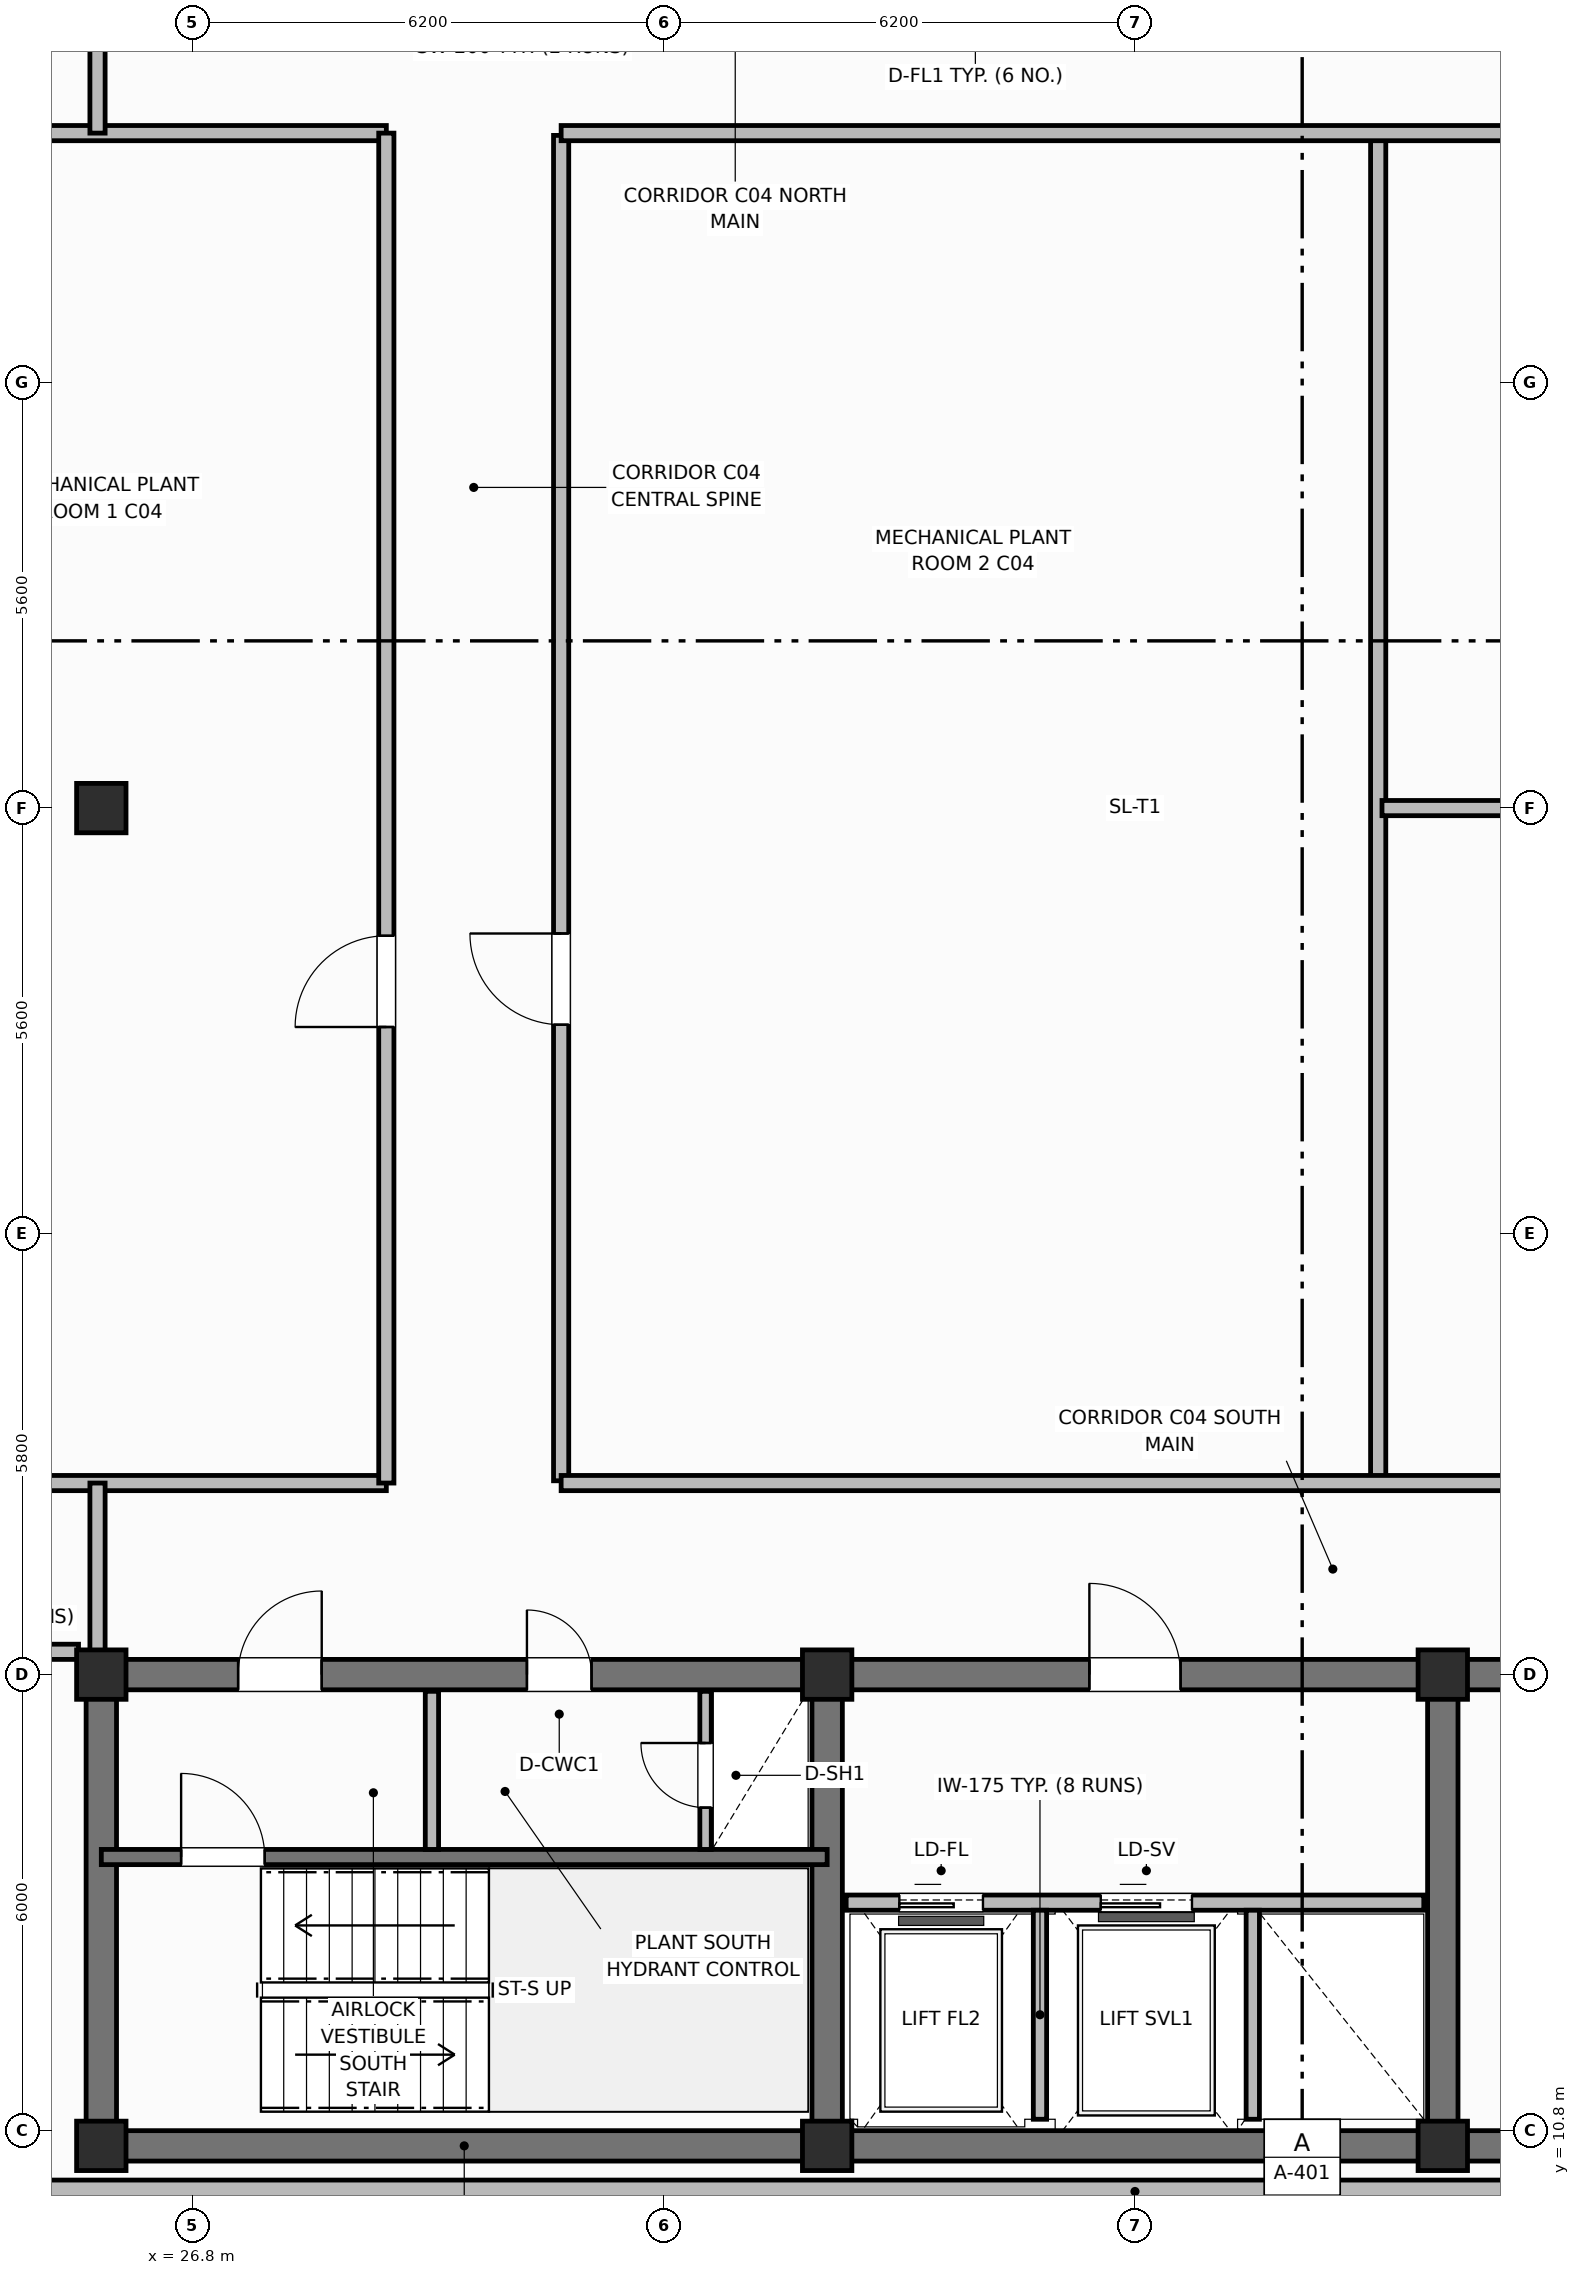
"""IFC4 building model, lengths in metres.
Left out: names, types, materials, properties, quantities, classifications, styles, units other than length and angle.
Written with IfcOpenShell. Run it as: python <this file> out.ifc"""

import sys

from ifc_helpers import new_model, si_unit, direction, frame, frame_2d, origin, origin_2d, place, context, subcontext, project, spatial, rectangle, extrude, element, fill, save


model = new_model("IFC4")
c1 = context("Model", 3, precision=1e-05, world=origin(), true_north=direction((0.0, 1.0)))
c2 = subcontext(c1, "Body", "Model", "MODEL_VIEW")
j1 = project(units=[si_unit("LENGTHUNIT", "METRE"), si_unit("PLANEANGLEUNIT", "RADIAN")], contexts=[c1])
p1 = place(None, origin())
s1 = spatial("IfcSite", under=j1, at=p1, CompositionType="ELEMENT")
p2 = place(p1, origin())
s2 = spatial("IfcBuilding", under=s1, at=p2, CompositionType="ELEMENT")
p3 = place(p2, frame((0.0, 0.0, 312.8)))
s3 = spatial("IfcBuildingStorey", under=s2, at=p3, CompositionType="ELEMENT", Elevation=312.8)
p4 = place(p3, frame((52.8, 10.6, 0.0), z_axis=(0.0, 0.0, 1.0), x_axis=(-1.0, 0.0, 0.0)))
e1 = element("IfcWall", 1, at=p4, inside=s3, PredefinedType="SHEAR", context=c2, shape_type="SweptSolid", body=[
    extrude(rectangle(XDim=27.2, YDim=0.4, at=frame_2d((13.6, 0.0))), origin(), (0.0, 0.0, 1.0), 3.6),
])
p5 = place(p3, frame((25.6, 10.8, 0.0), z_axis=(0.0, 0.0, 1.0), x_axis=(0.0, 1.0, 0.0)))
e2 = element("IfcWall", 2, at=p5, inside=s3, PredefinedType="SHEAR", context=c2, shape_type="SweptSolid", body=[
    extrude(rectangle(XDim=5.8, YDim=0.4, at=frame_2d((2.9, 0.0))), origin(), (0.0, 0.0, 1.0), 3.6),
])
p6 = place(p3, frame((25.6, 16.8, 0.0), z_axis=(0.0, 0.0, 1.0), x_axis=(1.0, 0.0, 0.0)))
e3 = element("IfcWall", 3, at=p6, inside=s3, PredefinedType="SHEAR", context=c2, shape_type="SweptSolid", body=[
    extrude(rectangle(XDim=27.2, YDim=0.4, at=frame_2d((13.6, 0.0))), origin(), (0.0, 0.0, 1.0), 3.6),
])
p7 = place(p6, frame((1.8, 0.0, 0.0)))
e4 = element("IfcOpeningElement", 4, at=p7, cuts=e3, PredefinedType="OPENING", context=c2, shape_type="SweptSolid", body=[
    extrude(rectangle(XDim=1.1, YDim=2.15, at=frame_2d((0.55, 1.075))), frame((0.0, 0.21, 0.0), z_axis=(0.0, -1.0, 0.0), x_axis=(1.0, 0.0, 0.0)), (0.0, 0.0, 1.0), 0.42),
])
p8 = place(p6, frame((5.6, 0.0, 0.0)))
e5 = element("IfcOpeningElement", 5, at=p8, cuts=e3, PredefinedType="OPENING", context=c2, shape_type="SweptSolid", body=[
    extrude(rectangle(XDim=0.85, YDim=2.1, at=frame_2d((0.425, 1.05))), frame((0.0, 0.21, 0.0), z_axis=(0.0, -1.0, 0.0), x_axis=(1.0, 0.0, 0.0)), (0.0, 0.0, 1.0), 0.42),
])
p9 = place(p6, frame((13.0, 0.0, 0.0)))
e6 = element("IfcOpeningElement", 6, at=p9, cuts=e3, PredefinedType="OPENING", context=c2, shape_type="SweptSolid", body=[
    extrude(rectangle(XDim=1.2, YDim=2.15, at=frame_2d((0.6, 1.075))), frame((0.0, 0.21, 0.0), z_axis=(0.0, -1.0, 0.0), x_axis=(1.0, 0.0, 0.0)), (0.0, 0.0, 1.0), 0.42),
])
p10 = place(p6, frame((19.2, 0.0, 0.0)))
e7 = element("IfcOpeningElement", 7, at=p10, cuts=e3, PredefinedType="OPENING", context=c2, shape_type="SweptSolid", body=[
    extrude(rectangle(XDim=0.85, YDim=2.1, at=frame_2d((0.425, 1.05))), frame((0.0, 0.21, 0.0), z_axis=(0.0, -1.0, 0.0), x_axis=(1.0, 0.0, 0.0)), (0.0, 0.0, 1.0), 0.42),
])
p11 = place(p6, frame((23.8, 0.0, 0.0)))
e8 = element("IfcOpeningElement", 8, at=p11, cuts=e3, PredefinedType="OPENING", context=c2, shape_type="SweptSolid", body=[
    extrude(rectangle(XDim=0.9, YDim=2.1, at=frame_2d((0.45, 1.05))), frame((0.0, 0.21, 0.0), z_axis=(0.0, -1.0, 0.0), x_axis=(1.0, 0.0, 0.0)), (0.0, 0.0, 1.0), 0.42),
])
for number, where, z_axis, x_axis in (
    (9, (35.15, 10.8, 0.0), (0.0, 0.0, 1.0), (0.0, 1.0, 0.0)),
    (10, (43.25, 10.8, 0.0), (0.0, 0.0, 1.0), (0.0, 1.0, 0.0)),
):
    element("IfcWall", number, at=place(p3, frame(where, z_axis=z_axis, x_axis=x_axis)), inside=s3, PredefinedType="SHEAR", context=c2, shape_type="SweptSolid", body=[
        extrude(rectangle(XDim=5.8, YDim=0.4, at=frame_2d((2.9, 0.0))), origin(), (0.0, 0.0, 1.0), 3.6),
    ])
for number, where, z_axis, x_axis in (
    (11, (25.6, 10.6, 0.0), (0.0, 0.0, 1.0), (1.0, 0.0, 0.0)),
    (12, (25.6, 16.8, 0.0), (0.0, 0.0, 1.0), (1.0, 0.0, 0.0)),
    (13, (35.15, 10.6, 0.0), (0.0, 0.0, 1.0), (1.0, 0.0, 0.0)),
    (14, (35.15, 16.8, 0.0), (0.0, 0.0, 1.0), (1.0, 0.0, 0.0)),
    (15, (43.25, 10.6, 0.0), (0.0, 0.0, 1.0), (1.0, 0.0, 0.0)),
    (16, (43.25, 16.8, 0.0), (0.0, 0.0, 1.0), (1.0, 0.0, 0.0)),
    (17, (25.6, 28.2, 0.0), (0.0, 0.0, 1.0), (1.0, 0.0, 0.0)),
):
    element("IfcColumn", number, at=place(p3, frame(where, z_axis=z_axis, x_axis=x_axis)), inside=s3, PredefinedType="COLUMN", context=c2, shape_type="SweptSolid", body=[
        extrude(rectangle(XDim=0.65, YDim=0.65, at=origin_2d()), origin(), (0.0, 0.0, 1.0), 3.6),
    ])
p12 = place(p3, frame((23.76, 10.0, 0.0), z_axis=(0.0, 0.0, 1.0), x_axis=(1.0, 0.0, 0.0)))
e18 = element("IfcWall", 18, at=p12, inside=s3, PredefinedType="SOLIDWALL", context=c2, shape_type="SweptSolid", body=[
    extrude(rectangle(XDim=30.88, YDim=0.3, at=frame_2d((15.44, 0.0))), origin(), (0.0, 0.0, 1.0), 2.84),
])
p13 = place(p3, frame((25.6, 14.4, 0.0), z_axis=(0.0, 0.0, 1.0), x_axis=(1.0, 0.0, 0.0)))
e19 = element("IfcWall", 19, at=p13, inside=s3, PredefinedType="SHEAR", context=c2, shape_type="SweptSolid", body=[
    extrude(rectangle(XDim=9.55, YDim=0.2, at=frame_2d((4.775, 0.0))), origin(), (0.0, 0.0, 1.0), 3.6),
])
p14 = place(p13, frame((1.05, 0.0, 0.0)))
e20 = element("IfcOpeningElement", 20, at=p14, cuts=e19, PredefinedType="OPENING", context=c2, shape_type="SweptSolid", body=[
    extrude(rectangle(XDim=1.1, YDim=2.15, at=frame_2d((0.55, 1.075))), frame((0.0, 0.11, 0.0), z_axis=(0.0, -1.0, 0.0), x_axis=(1.0, 0.0, 0.0)), (0.0, 0.0, 1.0), 0.22),
])
p15 = place(p3, frame((29.95, 14.5, 0.0), z_axis=(0.0, 0.0, 1.0), x_axis=(0.0, 1.0, 0.0)))
e21 = element("IfcWall", 21, at=p15, inside=s3, PredefinedType="PARTITIONING", context=c2, shape_type="SweptSolid", body=[
    extrude(rectangle(XDim=2.08, YDim=0.175, at=frame_2d((1.04, 0.0))), origin(), (0.0, 0.0, 1.0), 2.54),
])
p16 = place(p3, frame((33.55, 14.5, 0.0), z_axis=(0.0, 0.0, 1.0), x_axis=(0.0, 1.0, 0.0)))
e22 = element("IfcWall", 22, at=p16, inside=s3, PredefinedType="PARTITIONING", context=c2, shape_type="SweptSolid", body=[
    extrude(rectangle(XDim=2.08, YDim=0.15, at=frame_2d((1.04, 0.0))), origin(), (0.0, 0.0, 1.0), 2.54),
])
p17 = place(p16, frame((0.55, 0.0, 0.0)))
e23 = element("IfcOpeningElement", 23, at=p17, cuts=e22, PredefinedType="OPENING", context=c2, shape_type="SweptSolid", body=[
    extrude(rectangle(XDim=0.85, YDim=2.05, at=frame_2d((0.425, 1.025))), frame((0.0, 0.085, 0.0), z_axis=(0.0, -1.0, 0.0), x_axis=(1.0, 0.0, 0.0)), (0.0, 0.0, 1.0), 0.17),
])
p18 = place(p3, frame((35.4, 13.8, 0.0), z_axis=(0.0, 0.0, 1.0), x_axis=(1.0, 0.0, 0.0)))
e24 = element("IfcWall", 24, at=p18, inside=s3, PredefinedType="PARTITIONING", context=c2, shape_type="SweptSolid", body=[
    extrude(rectangle(XDim=7.6, YDim=0.2, at=frame_2d((3.8, 0.0))), origin(), (0.0, 0.0, 1.0), 2.2),
])
p19 = place(p18, frame((0.7, 0.0, 0.0)))
e25 = element("IfcOpeningElement", 25, at=p19, cuts=e24, PredefinedType="OPENING", context=c2, shape_type="SweptSolid", body=[
    extrude(rectangle(XDim=1.1, YDim=2.15, at=frame_2d((0.55, 1.075))), frame((0.0, 0.11, 0.0), z_axis=(0.0, -1.0, 0.0), x_axis=(1.0, 0.0, 0.0)), (0.0, 0.0, 1.0), 0.22),
])
p20 = place(p18, frame((3.35, 0.0, 0.0)))
e26 = element("IfcOpeningElement", 26, at=p20, cuts=e24, PredefinedType="OPENING", context=c2, shape_type="SweptSolid", body=[
    extrude(rectangle(XDim=1.2, YDim=2.15, at=frame_2d((0.6, 1.075))), frame((0.0, 0.11, 0.0), z_axis=(0.0, -1.0, 0.0), x_axis=(1.0, 0.0, 0.0)), (0.0, 0.0, 1.0), 0.22),
])
for number, where, z_axis, x_axis in (
    (27, (37.95, 10.95, 0.0), (0.0, 0.0, 1.0), (0.0, 1.0, 0.0)),
    (28, (40.75, 10.95, 0.0), (0.0, 0.0, 1.0), (0.0, 1.0, 0.0)),
):
    element("IfcWall", number, at=place(p3, frame(where, z_axis=z_axis, x_axis=x_axis)), inside=s3, PredefinedType="PARTITIONING", context=c2, shape_type="SweptSolid", body=[
        extrude(rectangle(XDim=2.75, YDim=0.175, at=frame_2d((1.375, 0.0))), origin(), (0.0, 0.0, 1.0), 2.54),
    ])
for number, where, z_axis, x_axis in (
    (29, (21.53, 19.32, 0.0), (0.0, 0.0, 1.0), (1.0, 0.0, 0.0)),
    (30, (21.53, 37.08, 0.0), (0.0, 0.0, 1.0), (1.0, 0.0, 0.0)),
):
    element("IfcWall", number, at=place(p3, frame(where, z_axis=z_axis, x_axis=x_axis)), inside=s3, PredefinedType="PARTITIONING", context=c2, shape_type="SweptSolid", body=[
        extrude(rectangle(XDim=7.82, YDim=0.2, at=frame_2d((3.91, 0.0))), origin(), (0.0, 0.0, 1.0), 2.54),
    ])
p21 = place(p3, frame((29.35, 19.32, 0.0), z_axis=(0.0, 0.0, 1.0), x_axis=(0.0, 1.0, 0.0)))
e31 = element("IfcWall", 31, at=p21, inside=s3, PredefinedType="PARTITIONING", context=c2, shape_type="SweptSolid", body=[
    extrude(rectangle(XDim=17.76, YDim=0.2, at=frame_2d((8.88, 0.0))), origin(), (0.0, 0.0, 1.0), 2.54),
])
p22 = place(p21, frame((6.0, 0.0, 0.0)))
e32 = element("IfcOpeningElement", 32, at=p22, cuts=e31, PredefinedType="OPENING", context=c2, shape_type="SweptSolid", body=[
    extrude(rectangle(XDim=1.2, YDim=2.15, at=frame_2d((0.6, 1.075))), frame((0.0, 0.11, 0.0), z_axis=(0.0, -1.0, 0.0), x_axis=(1.0, 0.0, 0.0)), (0.0, 0.0, 1.0), 0.22),
])
p23 = place(p3, frame((31.65, 19.35, 0.0), z_axis=(0.0, 0.0, 1.0), x_axis=(0.0, 1.0, 0.0)))
e33 = element("IfcWall", 33, at=p23, inside=s3, PredefinedType="PARTITIONING", context=c2, shape_type="SweptSolid", body=[
    extrude(rectangle(XDim=17.7, YDim=0.2, at=frame_2d((8.85, 0.0))), origin(), (0.0, 0.0, 1.0), 2.54),
])
p24 = place(p23, frame((6.0, 0.0, 0.0)))
e34 = element("IfcOpeningElement", 34, at=p24, cuts=e33, PredefinedType="OPENING", context=c2, shape_type="SweptSolid", body=[
    extrude(rectangle(XDim=1.2, YDim=2.15, at=frame_2d((0.6, 1.075))), frame((0.0, 0.11, 0.0), z_axis=(0.0, -1.0, 0.0), x_axis=(1.0, 0.0, 0.0)), (0.0, 0.0, 1.0), 0.22),
])
p25 = place(p3, frame((42.4, 19.35, 0.0), z_axis=(0.0, 0.0, 1.0), x_axis=(0.0, 1.0, 0.0)))
e35 = element("IfcWall", 35, at=p25, inside=s3, PredefinedType="PARTITIONING", context=c2, shape_type="SweptSolid", body=[
    extrude(rectangle(XDim=17.7, YDim=0.2, at=frame_2d((8.85, 0.0))), origin(), (0.0, 0.0, 1.0), 2.54),
])
p26 = place(p3, frame((42.45, 28.2, 0.0), z_axis=(0.0, 0.0, 1.0), x_axis=(1.0, 0.0, 0.0)))
e36 = element("IfcWall", 36, at=p26, inside=s3, PredefinedType="PARTITIONING", context=c2, shape_type="SweptSolid", body=[
    extrude(rectangle(XDim=14.42, YDim=0.2, at=frame_2d((7.21, 0.0))), origin(), (0.0, 0.0, 1.0), 2.54),
])
p27 = place(p3, frame((31.65, 19.32, 0.0), z_axis=(0.0, 0.0, 1.0), x_axis=(1.0, 0.0, 0.0)))
e37 = element("IfcWall", 37, at=p27, inside=s3, PredefinedType="PARTITIONING", context=c2, shape_type="SweptSolid", body=[
    extrude(rectangle(XDim=25.22, YDim=0.2, at=frame_2d((12.61, 0.0))), origin(), (0.0, 0.0, 1.0), 2.54),
])
p28 = place(p27, frame((17.15, 0.0, 0.0)))
e38 = element("IfcOpeningElement", 38, at=p28, cuts=e37, PredefinedType="OPENING", context=c2, shape_type="SweptSolid", body=[
    extrude(rectangle(XDim=1.2, YDim=2.15, at=frame_2d((0.6, 1.075))), frame((0.0, 0.11, 0.0), z_axis=(0.0, -1.0, 0.0), x_axis=(1.0, 0.0, 0.0)), (0.0, 0.0, 1.0), 0.22),
])
p29 = place(p3, frame((56.87, 37.08, 0.0), z_axis=(0.0, 0.0, 1.0), x_axis=(-1.0, 0.0, 0.0)))
e39 = element("IfcWall", 39, at=p29, inside=s3, PredefinedType="PARTITIONING", context=c2, shape_type="SweptSolid", body=[
    extrude(rectangle(XDim=25.22, YDim=0.2, at=frame_2d((12.61, 0.0))), origin(), (0.0, 0.0, 1.0), 2.54),
])
p30 = place(p29, frame((6.87, 0.0, 0.0)))
e40 = element("IfcOpeningElement", 40, at=p30, cuts=e39, PredefinedType="OPENING", context=c2, shape_type="SweptSolid", body=[
    extrude(rectangle(XDim=1.2, YDim=2.15, at=frame_2d((0.6, 1.075))), frame((0.0, 0.11, 0.0), z_axis=(0.0, -1.0, 0.0), x_axis=(1.0, 0.0, 0.0)), (0.0, 0.0, 1.0), 0.22),
])
p31 = place(p3, frame((25.55, 16.95, 0.0), z_axis=(0.0, 0.0, 1.0), x_axis=(0.0, 1.0, 0.0)))
e41 = element("IfcWall", 41, at=p31, inside=s3, PredefinedType="PARTITIONING", context=c2, shape_type="SweptSolid", body=[
    extrude(rectangle(XDim=2.37, YDim=0.2, at=frame_2d((1.185, 0.0))), origin(), (0.0, 0.0, 1.0), 2.54),
])
p32 = place(p3, frame((25.55, 37.08, 0.0), z_axis=(0.0, 0.0, 1.0), x_axis=(0.0, 1.0, 0.0)))
e42 = element("IfcWall", 42, at=p32, inside=s3, PredefinedType="PARTITIONING", context=c2, shape_type="SweptSolid", body=[
    extrude(rectangle(XDim=2.37, YDim=0.2, at=frame_2d((1.185, 0.0))), origin(), (0.0, 0.0, 1.0), 2.54),
])
p33 = place(p3, frame((21.53, 17.1, 0.0), z_axis=(0.0, 0.0, 1.0), x_axis=(1.0, 0.0, 0.0)))
e43 = element("IfcWall", 43, at=p33, inside=s3, PredefinedType="PARTITIONING", context=c2, shape_type="SweptSolid", body=[
    extrude(rectangle(XDim=3.77, YDim=0.2, at=frame_2d((1.885, 0.0))), origin(), (0.0, 0.0, 1.0), 2.54),
])
p34 = place(p14, origin())
e44 = element("IfcDoor", 44, at=p34, inside=s3, OperationType="SINGLE_SWING_LEFT", PredefinedType="DOOR", context=c2, shape_type="SweptSolid", body=[
    extrude(rectangle(XDim=1.1, YDim=2.15, at=frame_2d((0.55, 1.075))), frame((0.0, 0.025, 0.0), z_axis=(0.0, -1.0, 0.0), x_axis=(1.0, 0.0, 0.0)), (0.0, 0.0, 1.0), 0.05),
])
fill(e20, e44)
p35 = place(p17, origin())
e45 = element("IfcDoor", 45, at=p35, inside=s3, OperationType="SINGLE_SWING_RIGHT", PredefinedType="TRAPDOOR", context=c2, shape_type="SweptSolid", body=[
    extrude(rectangle(XDim=0.85, YDim=2.05, at=frame_2d((0.425, 1.025))), frame((0.0, 0.025, 0.0), z_axis=(0.0, -1.0, 0.0), x_axis=(1.0, 0.0, 0.0)), (0.0, 0.0, 1.0), 0.05),
])
fill(e23, e45)
p36 = place(p19, origin())
e46 = element("IfcDoor", 46, at=p36, inside=s3, OperationType="SLIDING_TO_LEFT", PredefinedType="DOOR", context=c2, shape_type="SweptSolid", body=[
    extrude(rectangle(XDim=1.1, YDim=2.15, at=frame_2d((0.55, 1.075))), frame((0.0, 0.025, 0.0), z_axis=(0.0, -1.0, 0.0), x_axis=(1.0, 0.0, 0.0)), (0.0, 0.0, 1.0), 0.05),
])
fill(e25, e46)
p37 = place(p20, origin())
e47 = element("IfcDoor", 47, at=p37, inside=s3, OperationType="SLIDING_TO_LEFT", PredefinedType="DOOR", context=c2, shape_type="SweptSolid", body=[
    extrude(rectangle(XDim=1.2, YDim=2.15, at=frame_2d((0.6, 1.075))), frame((0.0, 0.025, 0.0), z_axis=(0.0, -1.0, 0.0), x_axis=(1.0, 0.0, 0.0)), (0.0, 0.0, 1.0), 0.05),
])
fill(e26, e47)
p38 = place(p22, origin())
e48 = element("IfcDoor", 48, at=p38, inside=s3, OperationType="SINGLE_SWING_LEFT", PredefinedType="DOOR", context=c2, shape_type="SweptSolid", body=[
    extrude(rectangle(XDim=1.2, YDim=2.15, at=frame_2d((0.6, 1.075))), frame((0.0, 0.025, 0.0), z_axis=(0.0, -1.0, 0.0), x_axis=(1.0, 0.0, 0.0)), (0.0, 0.0, 1.0), 0.05),
])
fill(e32, e48)
p39 = place(p24, origin())
e49 = element("IfcDoor", 49, at=p39, inside=s3, OperationType="SINGLE_SWING_RIGHT", PredefinedType="DOOR", context=c2, shape_type="SweptSolid", body=[
    extrude(rectangle(XDim=1.2, YDim=2.15, at=frame_2d((0.6, 1.075))), frame((0.0, 0.025, 0.0), z_axis=(0.0, -1.0, 0.0), x_axis=(1.0, 0.0, 0.0)), (0.0, 0.0, 1.0), 0.05),
])
fill(e34, e49)
p40 = place(p7, origin())
e50 = element("IfcDoor", 50, at=p40, inside=s3, OperationType="SINGLE_SWING_RIGHT", PredefinedType="DOOR", context=c2, shape_type="SweptSolid", body=[
    extrude(rectangle(XDim=1.1, YDim=2.15, at=frame_2d((0.55, 1.075))), frame((0.0, 0.025, 0.0), z_axis=(0.0, -1.0, 0.0), x_axis=(1.0, 0.0, 0.0)), (0.0, 0.0, 1.0), 0.05),
])
fill(e4, e50)
p41 = place(p8, origin())
e51 = element("IfcDoor", 51, at=p41, inside=s3, OperationType="SINGLE_SWING_LEFT", PredefinedType="DOOR", context=c2, shape_type="SweptSolid", body=[
    extrude(rectangle(XDim=0.85, YDim=2.1, at=frame_2d((0.425, 1.05))), frame((0.0, 0.025, 0.0), z_axis=(0.0, -1.0, 0.0), x_axis=(1.0, 0.0, 0.0)), (0.0, 0.0, 1.0), 0.05),
])
fill(e5, e51)
p42 = place(p9, origin())
e52 = element("IfcDoor", 52, at=p42, inside=s3, OperationType="SINGLE_SWING_LEFT", PredefinedType="DOOR", context=c2, shape_type="SweptSolid", body=[
    extrude(rectangle(XDim=1.2, YDim=2.15, at=frame_2d((0.6, 1.075))), frame((0.0, 0.025, 0.0), z_axis=(0.0, -1.0, 0.0), x_axis=(1.0, 0.0, 0.0)), (0.0, 0.0, 1.0), 0.05),
])
fill(e6, e52)
save(model, sys.argv[1])
